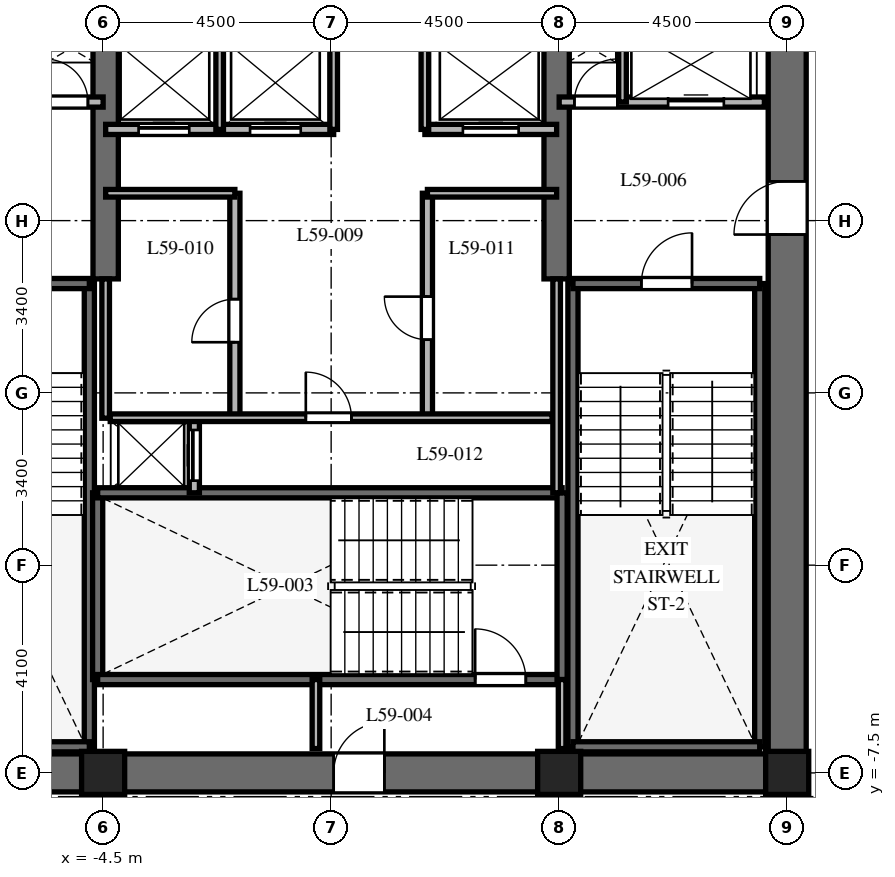
"""IFC4 building model, lengths in metres.
Left out: names, types, materials, properties, quantities, classifications, styles, units other than length and angle.
Written with IfcOpenShell. Run it as: python <this file> out.ifc"""

import sys

from ifc_helpers import new_model, si_unit, direction, frame, frame_2d, origin, origin_2d, place, context, subcontext, project, spatial, rectangle, extrude, element, fill, save


model = new_model("IFC4")
c1 = context("Model", 3, precision=1e-05, world=origin(), true_north=direction((0.0, 1.0)))
c2 = subcontext(c1, "Body", "Model", "MODEL_VIEW")
j1 = project(units=[si_unit("LENGTHUNIT", "METRE"), si_unit("PLANEANGLEUNIT", "RADIAN")], contexts=[c1])
p1 = place(None, origin())
s1 = spatial("IfcSite", under=j1, at=p1, CompositionType="ELEMENT")
p2 = place(p1, origin())
s2 = spatial("IfcBuilding", under=s1, at=p2, CompositionType="ELEMENT")
p3 = place(p2, frame((0.0, 0.0, 236.9)))
s3 = spatial("IfcBuildingStorey", under=s2, at=p3, CompositionType="ELEMENT", Elevation=236.9)
p4 = place(p3, frame((-9.375, -7.5, 0.0), z_axis=(0.0, 0.0, 1.0), x_axis=(1.0, 0.0, 0.0)))
e1 = element("IfcWall", 1, at=p4, inside=s3, PredefinedType="SHEAR", context=c2, shape_type="SweptSolid", body=[
    extrude(rectangle(XDim=18.75, YDim=0.75, at=frame_2d((9.375, 0.0))), origin(), (0.0, 0.0, 1.0), 3.8),
])
p5 = place(p4, frame((9.425, 0.0, 0.0)))
e2 = element("IfcOpeningElement", 2, at=p5, cuts=e1, PredefinedType="OPENING", context=c2, shape_type="SweptSolid", body=[
    extrude(rectangle(XDim=1.0, YDim=2.15, at=frame_2d((0.5, 1.075))), frame((0.0, 0.385, 0.0), z_axis=(0.0, -1.0, 0.0), x_axis=(1.0, 0.0, 0.0)), (0.0, 0.0, 1.0), 0.77),
])
p6 = place(p3, frame((9.0, -7.125, 0.0), z_axis=(0.0, 0.0, 1.0), x_axis=(0.0, 1.0, 0.0)))
e3 = element("IfcWall", 3, at=p6, inside=s3, PredefinedType="SHEAR", context=c2, shape_type="SweptSolid", body=[
    extrude(rectangle(XDim=14.25, YDim=0.75, at=frame_2d((7.125, 0.0))), origin(), (0.0, 0.0, 1.0), 3.8),
])
p7 = place(p6, frame((10.25, 0.0, 0.0)))
e4 = element("IfcOpeningElement", 4, at=p7, cuts=e3, PredefinedType="OPENING", context=c2, shape_type="SweptSolid", body=[
    extrude(rectangle(XDim=1.05, YDim=2.15, at=frame_2d((0.525, 1.075))), frame((0.0, 0.385, 0.0), z_axis=(0.0, -1.0, 0.0), x_axis=(1.0, 0.0, 0.0)), (0.0, 0.0, 1.0), 0.77),
])
for number, where, z_axis, x_axis in (
    (5, (-4.45, 2.25, 0.0), (0.0, 0.0, 1.0), (0.0, 1.0, 0.0)),
    (6, (4.45, 2.25, 0.0), (0.0, 0.0, 1.0), (0.0, 1.0, 0.0)),
):
    element("IfcWall", number, at=place(p3, frame(where, z_axis=z_axis, x_axis=x_axis)), inside=s3, PredefinedType="SHEAR", context=c2, shape_type="SweptSolid", body=[
        extrude(rectangle(XDim=4.875, YDim=0.5, at=frame_2d((2.438, 0.0))), origin(), (0.0, 0.0, 1.0), 3.8),
    ])
p8 = place(p3, frame((-4.772, -6.985, 0.0), z_axis=(0.0, 0.0, 1.0), x_axis=(0.0, 1.0, 0.0)))
e7 = element("IfcWall", 7, at=p8, inside=s3, PredefinedType="SHEAR", context=c2, shape_type="SweptSolid", body=[
    extrude(rectangle(XDim=9.143, YDim=0.2, at=frame_2d((4.572, 0.0))), origin(), (0.0, 0.0, 1.0), 3.8),
])
p9 = place(p3, frame((-8.458, -6.985, 0.0), z_axis=(0.0, 0.0, 1.0), x_axis=(1.0, 0.0, 0.0)))
e8 = element("IfcWall", 8, at=p9, inside=s3, PredefinedType="SHEAR", context=c2, shape_type="SweptSolid", body=[
    extrude(rectangle(XDim=3.686, YDim=0.2, at=frame_2d((1.843, 0.0))), origin(), (0.0, 0.0, 1.0), 3.8),
])
p10 = place(p3, frame((-8.458, 2.158, 0.0), z_axis=(0.0, 0.0, 1.0), x_axis=(1.0, 0.0, 0.0)))
e9 = element("IfcWall", 9, at=p10, inside=s3, PredefinedType="SHEAR", context=c2, shape_type="SweptSolid", body=[
    extrude(rectangle(XDim=3.686, YDim=0.2, at=frame_2d((1.843, 0.0))), origin(), (0.0, 0.0, 1.0), 3.8),
])
p11 = place(p10, frame((1.3, 0.0, 0.0)))
e10 = element("IfcOpeningElement", 10, at=p11, cuts=e9, PredefinedType="OPENING", context=c2, shape_type="SweptSolid", body=[
    extrude(rectangle(XDim=1.0, YDim=2.15, at=frame_2d((0.5, 1.075))), frame((0.0, 0.11, 0.0), z_axis=(0.0, -1.0, 0.0), x_axis=(1.0, 0.0, 0.0)), (0.0, 0.0, 1.0), 0.22),
])
for number, where, z_axis, x_axis in (
    (11, (4.772, -6.985, 0.0), (0.0, 0.0, 1.0), (0.0, 1.0, 0.0)),
    (12, (8.458, -6.985, 0.0), (0.0, 0.0, 1.0), (0.0, 1.0, 0.0)),
):
    element("IfcWall", number, at=place(p3, frame(where, z_axis=z_axis, x_axis=x_axis)), inside=s3, PredefinedType="SHEAR", context=c2, shape_type="SweptSolid", body=[
        extrude(rectangle(XDim=9.143, YDim=0.2, at=frame_2d((4.572, 0.0))), origin(), (0.0, 0.0, 1.0), 3.8),
    ])
p12 = place(p3, frame((4.772, -6.985, 0.0), z_axis=(0.0, 0.0, 1.0), x_axis=(1.0, 0.0, 0.0)))
e13 = element("IfcWall", 13, at=p12, inside=s3, PredefinedType="SHEAR", context=c2, shape_type="SweptSolid", body=[
    extrude(rectangle(XDim=3.686, YDim=0.2, at=frame_2d((1.843, 0.0))), origin(), (0.0, 0.0, 1.0), 3.8),
])
p13 = place(p3, frame((4.772, 2.158, 0.0), z_axis=(0.0, 0.0, 1.0), x_axis=(1.0, 0.0, 0.0)))
e14 = element("IfcWall", 14, at=p13, inside=s3, PredefinedType="SHEAR", context=c2, shape_type="SweptSolid", body=[
    extrude(rectangle(XDim=3.686, YDim=0.2, at=frame_2d((1.843, 0.0))), origin(), (0.0, 0.0, 1.0), 3.8),
])
p14 = place(p13, frame((1.35, 0.0, 0.0)))
e15 = element("IfcOpeningElement", 15, at=p14, cuts=e14, PredefinedType="OPENING", context=c2, shape_type="SweptSolid", body=[
    extrude(rectangle(XDim=1.0, YDim=2.15, at=frame_2d((0.5, 1.075))), frame((0.0, 0.11, 0.0), z_axis=(0.0, -1.0, 0.0), x_axis=(1.0, 0.0, 0.0)), (0.0, 0.0, 1.0), 0.22),
])
p15 = place(p3, frame((-4.608, -5.658, 0.0), z_axis=(0.0, 0.0, 1.0), x_axis=(0.0, 1.0, 0.0)))
e16 = element("IfcWall", 16, at=p15, inside=s3, PredefinedType="SHEAR", context=c2, shape_type="SweptSolid", body=[
    extrude(rectangle(XDim=3.686, YDim=0.2, at=frame_2d((1.843, 0.0))), origin(), (0.0, 0.0, 1.0), 3.8),
])
p16 = place(p3, frame((-4.608, -5.658, 0.0), z_axis=(0.0, 0.0, 1.0), x_axis=(1.0, 0.0, 0.0)))
e17 = element("IfcWall", 17, at=p16, inside=s3, PredefinedType="SHEAR", context=c2, shape_type="SweptSolid", body=[
    extrude(rectangle(XDim=9.166, YDim=0.2, at=frame_2d((4.583, 0.0))), origin(), (0.0, 0.0, 1.0), 3.8),
])
p17 = place(p16, frame((7.45, 0.0, 0.0)))
e18 = element("IfcOpeningElement", 18, at=p17, cuts=e17, PredefinedType="OPENING", context=c2, shape_type="SweptSolid", body=[
    extrude(rectangle(XDim=1.0, YDim=2.15, at=frame_2d((0.5, 1.075))), frame((0.0, 0.11, 0.0), z_axis=(0.0, -1.0, 0.0), x_axis=(1.0, 0.0, 0.0)), (0.0, 0.0, 1.0), 0.22),
])
p18 = place(p3, frame((-4.608, -1.972, 0.0), z_axis=(0.0, 0.0, 1.0), x_axis=(1.0, 0.0, 0.0)))
e19 = element("IfcWall", 19, at=p18, inside=s3, PredefinedType="SHEAR", context=c2, shape_type="SweptSolid", body=[
    extrude(rectangle(XDim=9.166, YDim=0.2, at=frame_2d((4.583, 0.0))), origin(), (0.0, 0.0, 1.0), 3.8),
])
p19 = place(p3, frame((4.558, -5.658, 0.0), z_axis=(0.0, 0.0, 1.0), x_axis=(0.0, 1.0, 0.0)))
e20 = element("IfcWall", 20, at=p19, inside=s3, PredefinedType="SHEAR", context=c2, shape_type="SweptSolid", body=[
    extrude(rectangle(XDim=3.686, YDim=0.2, at=frame_2d((1.843, 0.0))), origin(), (0.0, 0.0, 1.0), 3.8),
])
for number, where, z_axis, x_axis in (
    (21, (-4.5, -7.5, 0.0), (0.0, 0.0, 1.0), (1.0, 0.0, 0.0)),
    (22, (4.5, -7.5, 0.0), (0.0, 0.0, 1.0), (1.0, 0.0, 0.0)),
    (23, (9.0, -7.5, 0.0), (0.0, 0.0, 1.0), (1.0, 0.0, 0.0)),
):
    element("IfcColumn", number, at=place(p3, frame(where, z_axis=z_axis, x_axis=x_axis)), inside=s3, PredefinedType="COLUMN", context=c2, shape_type="SweptSolid", body=[
        extrude(rectangle(XDim=0.85, YDim=0.85, at=origin_2d()), origin(), (0.0, 0.0, 1.0), 3.8),
    ])
for number, where, z_axis, x_axis in (
    (24, (-0.3, -7.02, 0.0), (0.0, 0.0, 1.0), (0.0, 1.0, 0.0)),
    (25, (4.558, -7.02, 0.0), (0.0, 0.0, 1.0), (0.0, 1.0, 0.0)),
):
    element("IfcWall", number, at=place(p3, frame(where, z_axis=z_axis, x_axis=x_axis)), inside=s3, PredefinedType="PARTITIONING", context=c2, shape_type="SweptSolid", body=[
        extrude(rectangle(XDim=1.362, YDim=0.15, at=frame_2d((0.681, 0.0))), origin(), (0.0, 0.0, 1.0), 3.5),
    ])
p20 = place(p3, frame((-8.55, 5.74, 0.0), z_axis=(0.0, 0.0, 1.0), x_axis=(1.0, 0.0, 0.0)))
e26 = element("IfcWall", 26, at=p20, inside=s3, PredefinedType="PARTITIONING", context=c2, shape_type="SweptSolid", body=[
    extrude(rectangle(XDim=4.05, YDim=0.2, at=frame_2d((2.025, 0.0))), origin(), (0.0, 0.0, 1.0), 3.5),
])
p21 = place(p20, frame((0.75, 0.0, 0.0)))
e27 = element("IfcOpeningElement", 27, at=p21, cuts=e26, PredefinedType="OPENING", context=c2, shape_type="SweptSolid", body=[
    extrude(rectangle(XDim=1.1, YDim=2.2, at=frame_2d((0.55, 1.1))), frame((0.0, 0.11, 0.0), z_axis=(0.0, -1.0, 0.0), x_axis=(1.0, 0.0, 0.0)), (0.0, 0.0, 1.0), 0.22),
])
p22 = place(p20, frame((2.9, 0.0, 0.0)))
e28 = element("IfcOpeningElement", 28, at=p22, cuts=e26, PredefinedType="OPENING", context=c2, shape_type="SweptSolid", body=[
    extrude(rectangle(XDim=0.85, YDim=2.03, at=frame_2d((0.425, 1.015))), frame((0.0, 0.11, 0.0), z_axis=(0.0, -1.0, 0.0), x_axis=(1.0, 0.0, 0.0)), (0.0, 0.0, 1.0), 0.22),
])
p23 = place(p3, frame((4.5, 5.74, 0.0), z_axis=(0.0, 0.0, 1.0), x_axis=(1.0, 0.0, 0.0)))
e29 = element("IfcWall", 29, at=p23, inside=s3, PredefinedType="PARTITIONING", context=c2, shape_type="SweptSolid", body=[
    extrude(rectangle(XDim=4.05, YDim=0.2, at=frame_2d((2.025, 0.0))), origin(), (0.0, 0.0, 1.0), 3.5),
])
p24 = place(p23, frame((0.3, 0.0, 0.0)))
e30 = element("IfcOpeningElement", 30, at=p24, cuts=e29, PredefinedType="OPENING", context=c2, shape_type="SweptSolid", body=[
    extrude(rectangle(XDim=0.85, YDim=2.03, at=frame_2d((0.425, 1.015))), frame((0.0, 0.11, 0.0), z_axis=(0.0, -1.0, 0.0), x_axis=(1.0, 0.0, 0.0)), (0.0, 0.0, 1.0), 0.22),
])
p25 = place(p23, frame((2.15, 0.0, 0.0)))
e31 = element("IfcOpeningElement", 31, at=p25, cuts=e29, PredefinedType="OPENING", context=c2, shape_type="SweptSolid", body=[
    extrude(rectangle(XDim=1.1, YDim=2.2, at=frame_2d((0.55, 1.1))), frame((0.0, 0.11, 0.0), z_axis=(0.0, -1.0, 0.0), x_axis=(1.0, 0.0, 0.0)), (0.0, 0.0, 1.0), 0.22),
])
p26 = place(p3, frame((5.75, 5.74, 0.0), z_axis=(0.0, 0.0, 1.0), x_axis=(0.0, 1.0, 0.0)))
e32 = element("IfcWall", 32, at=p26, inside=s3, PredefinedType="PARTITIONING", context=c2, shape_type="SweptSolid", body=[
    extrude(rectangle(XDim=1.41, YDim=0.15, at=frame_2d((0.705, 0.0))), origin(), (0.0, 0.0, 1.0), 3.5),
])
p27 = place(p3, frame((-2.7, -1.972, 0.0), z_axis=(0.0, 0.0, 1.0), x_axis=(0.0, 1.0, 0.0)))
e33 = element("IfcWall", 33, at=p27, inside=s3, PredefinedType="PARTITIONING", context=c2, shape_type="SweptSolid", body=[
    extrude(rectangle(XDim=1.472, YDim=0.2, at=frame_2d((0.736, 0.0))), origin(), (0.0, 0.0, 1.0), 3.5),
])
p28 = place(p27, frame((0.24, 0.0, 0.0)))
e34 = element("IfcOpeningElement", 34, at=p28, cuts=e33, PredefinedType="OPENING", context=c2, shape_type="SweptSolid", body=[
    extrude(rectangle(XDim=1.0, YDim=2.2, at=frame_2d((0.5, 1.1))), frame((0.0, 0.11, 0.0), z_axis=(0.0, -1.0, 0.0), x_axis=(1.0, 0.0, 0.0)), (0.0, 0.0, 1.0), 0.22),
])
p29 = place(p3, frame((-4.45, 5.2, 0.0), z_axis=(0.0, 0.0, 1.0), x_axis=(1.0, 0.0, 0.0)))
e35 = element("IfcWall", 35, at=p29, inside=s3, PredefinedType="PARTITIONING", context=c2, shape_type="SweptSolid", body=[
    extrude(rectangle(XDim=4.5, YDim=0.2, at=frame_2d((2.25, 0.0))), origin(), (0.0, 0.0, 1.0), 3.5),
])
p30 = place(p29, frame((0.65, 0.0, 0.0)))
e36 = element("IfcOpeningElement", 36, at=p30, cuts=e35, PredefinedType="OPENING", context=c2, shape_type="SweptSolid", body=[
    extrude(rectangle(XDim=1.0, YDim=2.2, at=frame_2d((0.5, 1.1))), frame((0.0, 0.11, 0.0), z_axis=(0.0, -1.0, 0.0), x_axis=(1.0, 0.0, 0.0)), (0.0, 0.0, 1.0), 0.22),
])
p31 = place(p29, frame((2.85, 0.0, 0.0)))
e37 = element("IfcOpeningElement", 37, at=p31, cuts=e35, PredefinedType="OPENING", context=c2, shape_type="SweptSolid", body=[
    extrude(rectangle(XDim=1.0, YDim=2.2, at=frame_2d((0.5, 1.1))), frame((0.0, 0.11, 0.0), z_axis=(0.0, -1.0, 0.0), x_axis=(1.0, 0.0, 0.0)), (0.0, 0.0, 1.0), 0.22),
])
p32 = place(p3, frame((1.85, 5.2, 0.0), z_axis=(0.0, 0.0, 1.0), x_axis=(1.0, 0.0, 0.0)))
e38 = element("IfcWall", 38, at=p32, inside=s3, PredefinedType="PARTITIONING", context=c2, shape_type="SweptSolid", body=[
    extrude(rectangle(XDim=2.6, YDim=0.2, at=frame_2d((1.3, 0.0))), origin(), (0.0, 0.0, 1.0), 3.5),
])
p33 = place(p32, frame((0.75, 0.0, 0.0)))
e39 = element("IfcOpeningElement", 39, at=p33, cuts=e38, PredefinedType="OPENING", context=c2, shape_type="SweptSolid", body=[
    extrude(rectangle(XDim=1.1, YDim=2.2, at=frame_2d((0.55, 1.1))), frame((0.0, 0.11, 0.0), z_axis=(0.0, -1.0, 0.0), x_axis=(1.0, 0.0, 0.0)), (0.0, 0.0, 1.0), 0.22),
])
p34 = place(p3, frame((-2.2, 5.2, 0.0), z_axis=(0.0, 0.0, 1.0), x_axis=(0.0, 1.0, 0.0)))
e40 = element("IfcWall", 40, at=p34, inside=s3, PredefinedType="PARTITIONING", context=c2, shape_type="SweptSolid", body=[
    extrude(rectangle(XDim=1.85, YDim=0.15, at=frame_2d((0.925, 0.0))), origin(), (0.0, 0.0, 1.0), 3.5),
])
for number, where, z_axis, x_axis in (
    (41, (0.05, 5.2, 0.0), (0.0, 0.0, 1.0), (0.0, 1.0, 0.0)),
    (42, (1.85, 5.2, 0.0), (0.0, 0.0, 1.0), (0.0, 1.0, 0.0)),
):
    element("IfcWall", number, at=place(p3, frame(where, z_axis=z_axis, x_axis=x_axis)), inside=s3, PredefinedType="PARTITIONING", context=c2, shape_type="SweptSolid", body=[
        extrude(rectangle(XDim=1.95, YDim=0.15, at=frame_2d((0.975, 0.0))), origin(), (0.0, 0.0, 1.0), 3.5),
    ])
p35 = place(p3, frame((-4.45, -0.5, 0.0), z_axis=(0.0, 0.0, 1.0), x_axis=(0.0, 1.0, 0.0)))
e43 = element("IfcWall", 43, at=p35, inside=s3, PredefinedType="PARTITIONING", context=c2, shape_type="SweptSolid", body=[
    extrude(rectangle(XDim=2.75, YDim=0.15, at=frame_2d((1.375, 0.0))), origin(), (0.0, 0.0, 1.0), 3.5),
])
p36 = place(p3, frame((4.45, -1.972, 0.0), z_axis=(0.0, 0.0, 1.0), x_axis=(0.0, 1.0, 0.0)))
e44 = element("IfcWall", 44, at=p36, inside=s3, PredefinedType="PARTITIONING", context=c2, shape_type="SweptSolid", body=[
    extrude(rectangle(XDim=4.222, YDim=0.15, at=frame_2d((2.111, 0.0))), origin(), (0.0, 0.0, 1.0), 3.5),
])
p37 = place(p3, frame((-1.9, -0.5, 0.0), z_axis=(0.0, 0.0, 1.0), x_axis=(0.0, 1.0, 0.0)))
e45 = element("IfcWall", 45, at=p37, inside=s3, PredefinedType="PARTITIONING", context=c2, shape_type="SweptSolid", body=[
    extrude(rectangle(XDim=4.44, YDim=0.2, at=frame_2d((2.22, 0.0))), origin(), (0.0, 0.0, 1.0), 3.5),
])
p38 = place(p37, frame((1.5, 0.0, 0.0)))
e46 = element("IfcOpeningElement", 46, at=p38, cuts=e45, PredefinedType="OPENING", context=c2, shape_type="SweptSolid", body=[
    extrude(rectangle(XDim=0.85, YDim=2.03, at=frame_2d((0.425, 1.015))), frame((0.0, 0.11, 0.0), z_axis=(0.0, -1.0, 0.0), x_axis=(1.0, 0.0, 0.0)), (0.0, 0.0, 1.0), 0.22),
])
p39 = place(p3, frame((-4.45, 3.94, 0.0), z_axis=(0.0, 0.0, 1.0), x_axis=(1.0, 0.0, 0.0)))
e47 = element("IfcWall", 47, at=p39, inside=s3, PredefinedType="PARTITIONING", context=c2, shape_type="SweptSolid", body=[
    extrude(rectangle(XDim=2.55, YDim=0.15, at=frame_2d((1.275, 0.0))), origin(), (0.0, 0.0, 1.0), 3.5),
])
p40 = place(p3, frame((1.9, -0.5, 0.0), z_axis=(0.0, 0.0, 1.0), x_axis=(0.0, 1.0, 0.0)))
e48 = element("IfcWall", 48, at=p40, inside=s3, PredefinedType="PARTITIONING", context=c2, shape_type="SweptSolid", body=[
    extrude(rectangle(XDim=4.44, YDim=0.2, at=frame_2d((2.22, 0.0))), origin(), (0.0, 0.0, 1.0), 3.5),
])
p41 = place(p40, frame((1.55, 0.0, 0.0)))
e49 = element("IfcOpeningElement", 49, at=p41, cuts=e48, PredefinedType="OPENING", context=c2, shape_type="SweptSolid", body=[
    extrude(rectangle(XDim=0.85, YDim=2.03, at=frame_2d((0.425, 1.015))), frame((0.0, 0.11, 0.0), z_axis=(0.0, -1.0, 0.0), x_axis=(1.0, 0.0, 0.0)), (0.0, 0.0, 1.0), 0.22),
])
p42 = place(p3, frame((1.9, 3.94, 0.0), z_axis=(0.0, 0.0, 1.0), x_axis=(1.0, 0.0, 0.0)))
e50 = element("IfcWall", 50, at=p42, inside=s3, PredefinedType="PARTITIONING", context=c2, shape_type="SweptSolid", body=[
    extrude(rectangle(XDim=2.55, YDim=0.15, at=frame_2d((1.275, 0.0))), origin(), (0.0, 0.0, 1.0), 3.5),
])
p43 = place(p3, frame((-4.36, -0.49, 0.0), z_axis=(0.0, 0.0, 1.0), x_axis=(1.0, 0.0, 0.0)))
e51 = element("IfcWall", 51, at=p43, inside=s3, PredefinedType="PARTITIONING", context=c2, shape_type="SweptSolid", body=[
    extrude(rectangle(XDim=8.72, YDim=0.15, at=frame_2d((4.36, 0.0))), origin(), (0.0, 0.0, 1.0), 3.5),
])
p44 = place(p43, frame((3.86, 0.0, 0.0)))
e52 = element("IfcOpeningElement", 52, at=p44, cuts=e51, PredefinedType="OPENING", context=c2, shape_type="SweptSolid", body=[
    extrude(rectangle(XDim=0.9, YDim=2.03, at=frame_2d((0.45, 1.015))), frame((0.0, 0.085, 0.0), z_axis=(0.0, -1.0, 0.0), x_axis=(1.0, 0.0, 0.0)), (0.0, 0.0, 1.0), 0.17),
])
p45 = place(p14, origin())
e53 = element("IfcDoor", 53, at=p45, inside=s3, OperationType="SINGLE_SWING_RIGHT", PredefinedType="DOOR", context=c2, shape_type="SweptSolid", body=[
    extrude(rectangle(XDim=1.0, YDim=2.15, at=frame_2d((0.5, 1.075))), frame((0.0, 0.025, 0.0), z_axis=(0.0, -1.0, 0.0), x_axis=(1.0, 0.0, 0.0)), (0.0, 0.0, 1.0), 0.05),
])
fill(e15, e53)
p46 = place(p17, origin())
e54 = element("IfcDoor", 54, at=p46, inside=s3, OperationType="SINGLE_SWING_LEFT", PredefinedType="DOOR", context=c2, shape_type="SweptSolid", body=[
    extrude(rectangle(XDim=1.0, YDim=2.15, at=frame_2d((0.5, 1.075))), frame((0.0, 0.025, 0.0), z_axis=(0.0, -1.0, 0.0), x_axis=(1.0, 0.0, 0.0)), (0.0, 0.0, 1.0), 0.05),
])
fill(e18, e54)
p47 = place(p5, origin())
e55 = element("IfcDoor", 55, at=p47, inside=s3, OperationType="SINGLE_SWING_RIGHT", PredefinedType="DOOR", context=c2, shape_type="SweptSolid", body=[
    extrude(rectangle(XDim=1.0, YDim=2.15, at=frame_2d((0.5, 1.075))), frame((0.0, 0.025, 0.0), z_axis=(0.0, -1.0, 0.0), x_axis=(1.0, 0.0, 0.0)), (0.0, 0.0, 1.0), 0.05),
])
fill(e2, e55)
p48 = place(p7, origin())
e56 = element("IfcDoor", 56, at=p48, inside=s3, OperationType="SINGLE_SWING_LEFT", PredefinedType="DOOR", context=c2, shape_type="SweptSolid", body=[
    extrude(rectangle(XDim=1.05, YDim=2.15, at=frame_2d((0.525, 1.075))), frame((0.0, 0.025, 0.0), z_axis=(0.0, -1.0, 0.0), x_axis=(1.0, 0.0, 0.0)), (0.0, 0.0, 1.0), 0.05),
])
fill(e4, e56)
p49 = place(p22, origin())
e57 = element("IfcDoor", 57, at=p49, inside=s3, OperationType="SINGLE_SWING_LEFT", PredefinedType="DOOR", context=c2, shape_type="SweptSolid", body=[
    extrude(rectangle(XDim=0.85, YDim=2.03, at=frame_2d((0.425, 1.015))), frame((0.0, 0.025, 0.0), z_axis=(0.0, -1.0, 0.0), x_axis=(1.0, 0.0, 0.0)), (0.0, 0.0, 1.0), 0.05),
])
fill(e28, e57)
p50 = place(p24, origin())
e58 = element("IfcDoor", 58, at=p50, inside=s3, OperationType="SINGLE_SWING_RIGHT", PredefinedType="DOOR", context=c2, shape_type="SweptSolid", body=[
    extrude(rectangle(XDim=0.85, YDim=2.03, at=frame_2d((0.425, 1.015))), frame((0.0, 0.025, 0.0), z_axis=(0.0, -1.0, 0.0), x_axis=(1.0, 0.0, 0.0)), (0.0, 0.0, 1.0), 0.05),
])
fill(e30, e58)
p51 = place(p25, origin())
e59 = element("IfcDoor", 59, at=p51, inside=s3, OperationType="SLIDING_TO_RIGHT", PredefinedType="DOOR", context=c2, shape_type="SweptSolid", body=[
    extrude(rectangle(XDim=1.1, YDim=2.2, at=frame_2d((0.55, 1.1))), frame((0.0, 0.025, 0.0), z_axis=(0.0, -1.0, 0.0), x_axis=(1.0, 0.0, 0.0)), (0.0, 0.0, 1.0), 0.05),
])
fill(e31, e59)
p52 = place(p28, origin())
e60 = element("IfcDoor", 60, at=p52, inside=s3, OperationType="SLIDING_TO_LEFT", PredefinedType="DOOR", context=c2, shape_type="SweptSolid", body=[
    extrude(rectangle(XDim=1.0, YDim=2.2, at=frame_2d((0.5, 1.1))), frame((0.0, 0.025, 0.0), z_axis=(0.0, -1.0, 0.0), x_axis=(1.0, 0.0, 0.0)), (0.0, 0.0, 1.0), 0.05),
])
fill(e34, e60)
p53 = place(p30, origin())
e61 = element("IfcDoor", 61, at=p53, inside=s3, OperationType="SLIDING_TO_LEFT", PredefinedType="DOOR", context=c2, shape_type="SweptSolid", body=[
    extrude(rectangle(XDim=1.0, YDim=2.2, at=frame_2d((0.5, 1.1))), frame((0.0, 0.025, 0.0), z_axis=(0.0, -1.0, 0.0), x_axis=(1.0, 0.0, 0.0)), (0.0, 0.0, 1.0), 0.05),
])
fill(e36, e61)
p54 = place(p31, origin())
e62 = element("IfcDoor", 62, at=p54, inside=s3, OperationType="SLIDING_TO_RIGHT", PredefinedType="DOOR", context=c2, shape_type="SweptSolid", body=[
    extrude(rectangle(XDim=1.0, YDim=2.2, at=frame_2d((0.5, 1.1))), frame((0.0, 0.025, 0.0), z_axis=(0.0, -1.0, 0.0), x_axis=(1.0, 0.0, 0.0)), (0.0, 0.0, 1.0), 0.05),
])
fill(e37, e62)
p55 = place(p33, origin())
e63 = element("IfcDoor", 63, at=p55, inside=s3, OperationType="SLIDING_TO_RIGHT", PredefinedType="DOOR", context=c2, shape_type="SweptSolid", body=[
    extrude(rectangle(XDim=1.1, YDim=2.2, at=frame_2d((0.55, 1.1))), frame((0.0, 0.025, 0.0), z_axis=(0.0, -1.0, 0.0), x_axis=(1.0, 0.0, 0.0)), (0.0, 0.0, 1.0), 0.05),
])
fill(e39, e63)
p56 = place(p38, origin())
e64 = element("IfcDoor", 64, at=p56, inside=s3, OperationType="SINGLE_SWING_LEFT", PredefinedType="DOOR", context=c2, shape_type="SweptSolid", body=[
    extrude(rectangle(XDim=0.85, YDim=2.03, at=frame_2d((0.425, 1.015))), frame((0.0, 0.025, 0.0), z_axis=(0.0, -1.0, 0.0), x_axis=(1.0, 0.0, 0.0)), (0.0, 0.0, 1.0), 0.05),
])
fill(e46, e64)
p57 = place(p41, origin())
e65 = element("IfcDoor", 65, at=p57, inside=s3, OperationType="SINGLE_SWING_RIGHT", PredefinedType="DOOR", context=c2, shape_type="SweptSolid", body=[
    extrude(rectangle(XDim=0.85, YDim=2.03, at=frame_2d((0.425, 1.015))), frame((0.0, 0.025, 0.0), z_axis=(0.0, -1.0, 0.0), x_axis=(1.0, 0.0, 0.0)), (0.0, 0.0, 1.0), 0.05),
])
fill(e49, e65)
p58 = place(p44, origin())
e66 = element("IfcDoor", 66, at=p58, inside=s3, OperationType="SINGLE_SWING_LEFT", PredefinedType="DOOR", context=c2, shape_type="SweptSolid", body=[
    extrude(rectangle(XDim=0.9, YDim=2.03, at=frame_2d((0.45, 1.015))), frame((0.0, 0.025, 0.0), z_axis=(0.0, -1.0, 0.0), x_axis=(1.0, 0.0, 0.0)), (0.0, 0.0, 1.0), 0.05),
])
fill(e52, e66)
save(model, sys.argv[1])
